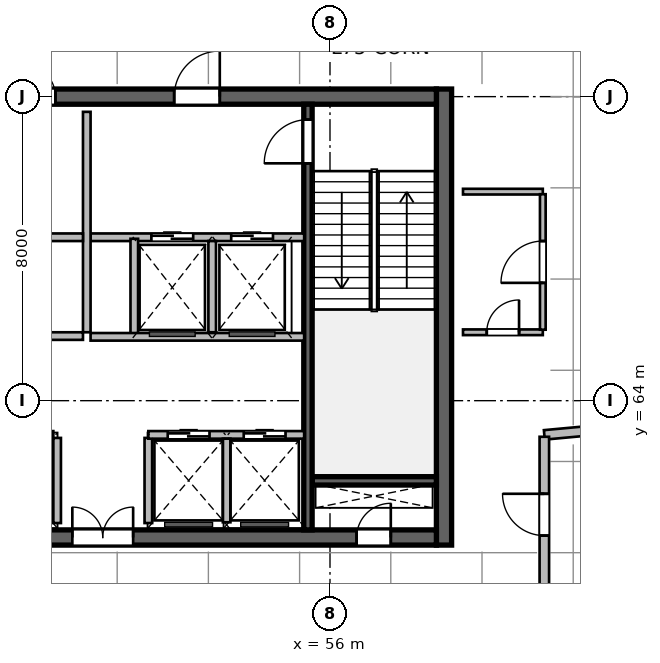
"""IFC4 building model, lengths in metres.
Left out: names, types, materials, properties, quantities, classifications, styles, units other than length and angle.
Written with IfcOpenShell. Run it as: python <this file> out.ifc"""

import sys

from ifc_helpers import new_model, si_unit, direction, frame, frame_2d, origin, place, context, subcontext, project, spatial, rectangle, extrude, source, transform, mapped, element, fill, save


model = new_model("IFC4")
c1 = context("Model", 3, precision=1e-05, world=origin(), true_north=direction((0.0, 1.0)))
c2 = subcontext(c1, "Body", "Model", "MODEL_VIEW")
j1 = project(units=[si_unit("LENGTHUNIT", "METRE"), si_unit("PLANEANGLEUNIT", "RADIAN")], contexts=[c1])
p1 = place(None, origin())
s1 = spatial("IfcSite", under=j1, at=p1, CompositionType="ELEMENT")
p2 = place(p1, origin())
s2 = spatial("IfcBuilding", under=s1, at=p2, CompositionType="ELEMENT")
p3 = place(p2, frame((0.0, 0.0, 307.8)))
s3 = spatial("IfcBuildingStorey", under=s2, at=p3, CompositionType="ELEMENT", Elevation=307.8)
m1 = source(origin(), c2, "Body", "SweptSolid", [
    extrude(rectangle(XDim=12.0, YDim=0.4, at=frame_2d((6.0, 0.0))), origin(), (0.0, 0.0, 1.0), 4.8),
])
p4 = place(p3, frame((59.0, 60.2, 0.0), z_axis=(0.0, 0.0, 1.0), x_axis=(0.0, 1.0, 0.0)))
e1 = element("IfcWall", 1, at=p4, inside=s3, PredefinedType="SHEAR", context=c2, shape_type="MappedRepresentation", body=[
    mapped(m1, transform((0.0, 0.0, 0.0), scale=1.0)),
])
m2 = source(origin(), c2, "Body", "SweptSolid", [
    extrude(rectangle(XDim=21.6, YDim=0.4, at=frame_2d((10.8, 0.0))), origin(), (0.0, 0.0, 1.0), 4.8),
])
p5 = place(p3, frame((37.2, 60.4, 0.0), z_axis=(0.0, 0.0, 1.0), x_axis=(1.0, 0.0, 0.0)))
e2 = element("IfcWall", 2, at=p5, inside=s3, PredefinedType="SHEAR", context=c2, shape_type="MappedRepresentation", body=[
    mapped(m2, transform((0.0, 0.0, 0.0), scale=1.0)),
])
p6 = place(p5, frame((1.1, 0.0, 0.0)))
e3 = element("IfcOpeningElement", 3, at=p6, cuts=e2, PredefinedType="OPENING", context=c2, shape_type="SweptSolid", body=[
    extrude(rectangle(XDim=1.15, YDim=2.15, at=frame_2d((0.575, 1.075))), frame((0.0, 0.21, 0.0), z_axis=(0.0, -1.0, 0.0), x_axis=(1.0, 0.0, 0.0)), (0.0, 0.0, 1.0), 0.42),
])
p7 = place(p5, frame((19.5, 0.0, 0.0)))
e4 = element("IfcOpeningElement", 4, at=p7, cuts=e2, PredefinedType="OPENING", context=c2, shape_type="SweptSolid", body=[
    extrude(rectangle(XDim=0.9, YDim=2.1, at=frame_2d((0.45, 1.05))), frame((0.0, 0.21, 0.0), z_axis=(0.0, -1.0, 0.0), x_axis=(1.0, 0.0, 0.0)), (0.0, 0.0, 1.0), 0.42),
])
p8 = place(p5, frame((12.02, 0.0, 0.0)))
e5 = element("IfcOpeningElement", 5, at=p8, cuts=e2, PredefinedType="OPENING", context=c2, shape_type="SweptSolid", body=[
    extrude(rectangle(XDim=1.6, YDim=2.15, at=frame_2d((0.8, 1.075))), frame((0.0, 0.21, 0.0), z_axis=(0.0, -1.0, 0.0), x_axis=(1.0, 0.0, 0.0)), (0.0, 0.0, 1.0), 0.42),
])
p9 = place(p3, frame((37.2, 72.0, 0.0), z_axis=(0.0, 0.0, 1.0), x_axis=(1.0, 0.0, 0.0)))
e6 = element("IfcWall", 6, at=p9, inside=s3, PredefinedType="SHEAR", context=c2, shape_type="MappedRepresentation", body=[
    mapped(m2, transform((0.0, 0.0, 0.0), scale=1.0)),
])
p10 = place(p9, frame((1.2, 0.0, 0.0)))
e7 = element("IfcOpeningElement", 7, at=p10, cuts=e6, PredefinedType="OPENING", context=c2, shape_type="SweptSolid", body=[
    extrude(rectangle(XDim=0.9, YDim=2.1, at=frame_2d((0.45, 1.05))), frame((0.0, 0.21, 0.0), z_axis=(0.0, -1.0, 0.0), x_axis=(1.0, 0.0, 0.0)), (0.0, 0.0, 1.0), 0.42),
])
p11 = place(p9, frame((14.7, 0.0, 0.0)))
e8 = element("IfcOpeningElement", 8, at=p11, cuts=e6, PredefinedType="OPENING", context=c2, shape_type="SweptSolid", body=[
    extrude(rectangle(XDim=1.2, YDim=2.15, at=frame_2d((0.6, 1.075))), frame((0.0, 0.21, 0.0), z_axis=(0.0, -1.0, 0.0), x_axis=(1.0, 0.0, 0.0)), (0.0, 0.0, 1.0), 0.42),
])
p12 = place(p9, frame((4.15, 0.0, 0.0)))
e9 = element("IfcOpeningElement", 9, at=p12, cuts=e6, PredefinedType="OPENING", context=c2, shape_type="SweptSolid", body=[
    extrude(rectangle(XDim=1.3, YDim=2.15, at=frame_2d((0.65, 1.075))), frame((0.0, 0.21, 0.0), z_axis=(0.0, -1.0, 0.0), x_axis=(1.0, 0.0, 0.0)), (0.0, 0.0, 1.0), 0.42),
])
p13 = place(p9, frame((6.76, 0.0, 0.0)))
e10 = element("IfcOpeningElement", 10, at=p13, cuts=e6, PredefinedType="OPENING", context=c2, shape_type="SweptSolid", body=[
    extrude(rectangle(XDim=0.85, YDim=2.1, at=frame_2d((0.425, 1.05))), frame((0.0, 0.21, 0.0), z_axis=(0.0, -1.0, 0.0), x_axis=(1.0, 0.0, 0.0)), (0.0, 0.0, 1.0), 0.42),
])
p14 = place(p9, frame((8.76, 0.0, 0.0)))
e11 = element("IfcOpeningElement", 11, at=p14, cuts=e6, PredefinedType="OPENING", context=c2, shape_type="SweptSolid", body=[
    extrude(rectangle(XDim=0.85, YDim=2.1, at=frame_2d((0.425, 1.05))), frame((0.0, 0.21, 0.0), z_axis=(0.0, -1.0, 0.0), x_axis=(1.0, 0.0, 0.0)), (0.0, 0.0, 1.0), 0.42),
])
p15 = place(p9, frame((10.725, 0.0, 0.0)))
e12 = element("IfcOpeningElement", 12, at=p15, cuts=e6, PredefinedType="OPENING", context=c2, shape_type="SweptSolid", body=[
    extrude(rectangle(XDim=0.85, YDim=2.1, at=frame_2d((0.425, 1.05))), frame((0.0, 0.21, 0.0), z_axis=(0.0, -1.0, 0.0), x_axis=(1.0, 0.0, 0.0)), (0.0, 0.0, 1.0), 0.42),
])
m3 = source(origin(), c2, "Body", "SweptSolid", [
    extrude(rectangle(XDim=3.27, YDim=0.22, at=frame_2d((1.635, 0.0))), origin(), (0.0, 0.0, 1.0), 4.8),
])
p16 = place(p3, frame((55.53, 61.89, 0.0), z_axis=(0.0, 0.0, 1.0), x_axis=(1.0, 0.0, 0.0)))
e13 = element("IfcWall", 13, at=p16, inside=s3, PredefinedType="SHEAR", context=c2, shape_type="MappedRepresentation", body=[
    mapped(m3, transform((0.0, 0.0, 0.0), scale=1.0)),
])
m4 = source(origin(), c2, "Body", "SweptSolid", [
    extrude(rectangle(XDim=11.2, YDim=0.22, at=frame_2d((5.6, 0.0))), origin(), (0.0, 0.0, 1.0), 4.8),
])
p17 = place(p3, frame((55.42, 60.6, 0.0), z_axis=(0.0, 0.0, 1.0), x_axis=(0.0, 1.0, 0.0)))
e14 = element("IfcWall", 14, at=p17, inside=s3, PredefinedType="SHEAR", context=c2, shape_type="MappedRepresentation", body=[
    mapped(m4, transform((0.0, 0.0, 0.0), scale=1.0)),
])
p18 = place(p17, frame((9.645, 0.0, 0.0)))
e15 = element("IfcOpeningElement", 15, at=p18, cuts=e14, PredefinedType="OPENING", context=c2, shape_type="SweptSolid", body=[
    extrude(rectangle(XDim=1.15, YDim=2.15, at=frame_2d((0.575, 1.075))), frame((0.0, 0.12, 0.0), z_axis=(0.0, -1.0, 0.0), x_axis=(1.0, 0.0, 0.0)), (0.0, 0.0, 1.0), 0.24),
])
m5 = source(origin(), c2, "Body", "SweptSolid", [
    extrude(rectangle(XDim=2.24, YDim=0.2, at=frame_2d((1.12, 0.0))), origin(), (0.0, 0.0, 1.0), 4.5),
])
for number, where, z_axis, x_axis in (
    (16, (48.82, 60.78, 0.0), (0.0, 0.0, 1.0), (0.0, 1.0, 0.0)),
    (17, (51.22, 60.78, 0.0), (0.0, 0.0, 1.0), (0.0, 1.0, 0.0)),
):
    element("IfcWall", number, at=place(p3, frame(where, z_axis=z_axis, x_axis=x_axis)), inside=s3, PredefinedType="SOLIDWALL", context=c2, shape_type="MappedRepresentation", body=[
        mapped(m5, transform((0.0, 0.0, 0.0), scale=1.0)),
    ])
m6 = source(origin(), c2, "Body", "SweptSolid", [
    extrude(rectangle(XDim=5.62, YDim=0.2, at=frame_2d((2.81, 0.0))), origin(), (0.0, 0.0, 1.0), 4.5),
])
p19 = place(p3, frame((49.7, 68.3, 0.0), z_axis=(0.0, 0.0, 1.0), x_axis=(1.0, 0.0, 0.0)))
e18 = element("IfcWall", 18, at=p19, inside=s3, PredefinedType="SOLIDWALL", context=c2, shape_type="MappedRepresentation", body=[
    mapped(m6, transform((0.0, 0.0, 0.0), scale=1.0)),
])
p20 = place(p19, frame((1.6, 0.0, 0.0)))
e19 = element("IfcOpeningElement", 19, at=p20, cuts=e18, PredefinedType="OPENING", context=c2, shape_type="SweptSolid", body=[
    extrude(rectangle(XDim=1.1, YDim=2.15, at=frame_2d((0.55, 1.075))), frame((0.0, 0.11, 0.0), z_axis=(0.0, -1.0, 0.0), x_axis=(1.0, 0.0, 0.0)), (0.0, 0.0, 1.0), 0.22),
])
p21 = place(p19, frame((3.7, 0.0, 0.0)))
e20 = element("IfcOpeningElement", 20, at=p21, cuts=e18, PredefinedType="OPENING", context=c2, shape_type="SweptSolid", body=[
    extrude(rectangle(XDim=1.1, YDim=2.15, at=frame_2d((0.55, 1.075))), frame((0.0, 0.11, 0.0), z_axis=(0.0, -1.0, 0.0), x_axis=(1.0, 0.0, 0.0)), (0.0, 0.0, 1.0), 0.22),
])
m7 = source(origin(), c2, "Body", "SweptSolid", [
    extrude(rectangle(XDim=5.8, YDim=0.2, at=frame_2d((2.9, 0.0))), origin(), (0.0, 0.0, 1.0), 4.5),
])
p22 = place(p3, frame((49.6, 65.8, 0.0), z_axis=(0.0, 0.0, 1.0), x_axis=(0.0, 1.0, 0.0)))
e21 = element("IfcWall", 21, at=p22, inside=s3, PredefinedType="SOLIDWALL", context=c2, shape_type="MappedRepresentation", body=[
    mapped(m7, transform((0.0, 0.0, 0.0), scale=1.0)),
])
m8 = source(origin(), c2, "Body", "SweptSolid", [
    extrude(rectangle(XDim=2.58, YDim=0.2, at=frame_2d((1.29, 0.0))), origin(), (0.0, 0.0, 1.0), 4.5),
])
p23 = place(p3, frame((50.85, 65.68, 0.0), z_axis=(0.0, 0.0, 1.0), x_axis=(0.0, 1.0, 0.0)))
e22 = element("IfcWall", 22, at=p23, inside=s3, PredefinedType="SOLIDWALL", context=c2, shape_type="MappedRepresentation", body=[
    mapped(m8, transform((0.0, 0.0, 0.0), scale=1.0)),
])
m9 = source(origin(), c2, "Body", "SweptSolid", [
    extrude(rectangle(XDim=2.4, YDim=0.2, at=frame_2d((1.2, 0.0))), origin(), (0.0, 0.0, 1.0), 4.5),
])
p24 = place(p3, frame((52.9, 65.8, 0.0), z_axis=(0.0, 0.0, 1.0), x_axis=(0.0, 1.0, 0.0)))
e23 = element("IfcWall", 23, at=p24, inside=s3, PredefinedType="SOLIDWALL", context=c2, shape_type="MappedRepresentation", body=[
    mapped(m9, transform((0.0, 0.0, 0.0), scale=1.0)),
])
p25 = place(p3, frame((49.7, 65.68, 0.0), z_axis=(0.0, 0.0, 1.0), x_axis=(1.0, 0.0, 0.0)))
e24 = element("IfcWall", 24, at=p25, inside=s3, PredefinedType="SOLIDWALL", context=c2, shape_type="MappedRepresentation", body=[
    mapped(m6, transform((0.0, 0.0, 0.0), scale=1.0)),
])
m10 = source(origin(), c2, "Body", "SweptSolid", [
    extrude(rectangle(XDim=8.8, YDim=0.2, at=frame_2d((4.4, 0.0))), origin(), (0.0, 0.0, 1.0), 4.5),
])
p26 = place(p3, frame((40.7, 68.3, 0.0), z_axis=(0.0, 0.0, 1.0), x_axis=(1.0, 0.0, 0.0)))
e25 = element("IfcWall", 25, at=p26, inside=s3, PredefinedType="SOLIDWALL", context=c2, shape_type="MappedRepresentation", body=[
    mapped(m10, transform((0.0, 0.0, 0.0), scale=1.0)),
])
m11 = source(origin(), c2, "Body", "SweptSolid", [
    extrude(rectangle(XDim=8.02, YDim=0.2, at=frame_2d((4.01, 0.0))), origin(), (0.0, 0.0, 1.0), 4.5),
])
p27 = place(p3, frame((40.7, 63.1, 0.0), z_axis=(0.0, 0.0, 1.0), x_axis=(1.0, 0.0, 0.0)))
e26 = element("IfcWall", 26, at=p27, inside=s3, PredefinedType="SOLIDWALL", context=c2, shape_type="MappedRepresentation", body=[
    mapped(m11, transform((0.0, 0.0, 0.0), scale=1.0)),
])
p28 = place(p27, frame((0.72, 0.0, 0.0)))
e27 = element("IfcOpeningElement", 27, at=p28, cuts=e26, PredefinedType="OPENING", context=c2, shape_type="SweptSolid", body=[
    extrude(rectangle(XDim=1.0, YDim=2.15, at=frame_2d((0.5, 1.075))), frame((0.0, 0.11, 0.0), z_axis=(0.0, -1.0, 0.0), x_axis=(1.0, 0.0, 0.0)), (0.0, 0.0, 1.0), 0.22),
])
p29 = place(p27, frame((2.62, 0.0, 0.0)))
e28 = element("IfcOpeningElement", 28, at=p29, cuts=e26, PredefinedType="OPENING", context=c2, shape_type="SweptSolid", body=[
    extrude(rectangle(XDim=1.0, YDim=2.15, at=frame_2d((0.5, 1.075))), frame((0.0, 0.11, 0.0), z_axis=(0.0, -1.0, 0.0), x_axis=(1.0, 0.0, 0.0)), (0.0, 0.0, 1.0), 0.22),
])
p30 = place(p27, frame((4.55, 0.0, 0.0)))
e29 = element("IfcOpeningElement", 29, at=p30, cuts=e26, PredefinedType="OPENING", context=c2, shape_type="SweptSolid", body=[
    extrude(rectangle(XDim=1.0, YDim=2.15, at=frame_2d((0.5, 1.075))), frame((0.0, 0.11, 0.0), z_axis=(0.0, -1.0, 0.0), x_axis=(1.0, 0.0, 0.0)), (0.0, 0.0, 1.0), 0.22),
])
p31 = place(p27, frame((6.55, 0.0, 0.0)))
e30 = element("IfcOpeningElement", 30, at=p31, cuts=e26, PredefinedType="OPENING", context=c2, shape_type="SweptSolid", body=[
    extrude(rectangle(XDim=1.0, YDim=2.15, at=frame_2d((0.5, 1.075))), frame((0.0, 0.11, 0.0), z_axis=(0.0, -1.0, 0.0), x_axis=(1.0, 0.0, 0.0)), (0.0, 0.0, 1.0), 0.22),
])
m12 = source(origin(), c2, "Body", "SweptSolid", [
    extrude(rectangle(XDim=4.1, YDim=0.2, at=frame_2d((2.05, 0.0))), origin(), (0.0, 0.0, 1.0), 4.5),
])
p32 = place(p3, frame((51.22, 63.1, 0.0), z_axis=(0.0, 0.0, 1.0), x_axis=(1.0, 0.0, 0.0)))
e31 = element("IfcWall", 31, at=p32, inside=s3, PredefinedType="SOLIDWALL", context=c2, shape_type="MappedRepresentation", body=[
    mapped(m12, transform((0.0, 0.0, 0.0), scale=1.0)),
])
p33 = place(p32, frame((0.51, 0.0, 0.0)))
e32 = element("IfcOpeningElement", 32, at=p33, cuts=e31, PredefinedType="OPENING", context=c2, shape_type="SweptSolid", body=[
    extrude(rectangle(XDim=1.1, YDim=2.15, at=frame_2d((0.55, 1.075))), frame((0.0, 0.11, 0.0), z_axis=(0.0, -1.0, 0.0), x_axis=(1.0, 0.0, 0.0)), (0.0, 0.0, 1.0), 0.22),
])
p34 = place(p32, frame((2.51, 0.0, 0.0)))
e33 = element("IfcOpeningElement", 33, at=p34, cuts=e31, PredefinedType="OPENING", context=c2, shape_type="SweptSolid", body=[
    extrude(rectangle(XDim=1.1, YDim=2.15, at=frame_2d((0.55, 1.075))), frame((0.0, 0.11, 0.0), z_axis=(0.0, -1.0, 0.0), x_axis=(1.0, 0.0, 0.0)), (0.0, 0.0, 1.0), 0.22),
])
m13 = source(origin(), c2, "Body", "SweptSolid", [
    extrude(rectangle(XDim=2.2, YDim=0.2, at=frame_2d((1.1, 0.0))), origin(), (0.0, 0.0, 1.0), 4.5),
])
p35 = place(p3, frame((53.28, 60.8, 0.0), z_axis=(0.0, 0.0, 1.0), x_axis=(0.0, 1.0, 0.0)))
e34 = element("IfcWall", 34, at=p35, inside=s3, PredefinedType="SOLIDWALL", context=c2, shape_type="MappedRepresentation", body=[
    mapped(m13, transform((0.0, 0.0, 0.0), scale=1.0)),
])
p36 = place(p3, frame((40.7, 65.7, 0.0), z_axis=(0.0, 0.0, 1.0), x_axis=(1.0, 0.0, 0.0)))
e35 = element("IfcWall", 35, at=p36, inside=s3, PredefinedType="SOLIDWALL", context=c2, shape_type="MappedRepresentation", body=[
    mapped(m10, transform((0.0, 0.0, 0.0), scale=1.0)),
])
p37 = place(p36, frame((3.8, 0.0, 0.0)))
e36 = element("IfcOpeningElement", 36, at=p37, cuts=e35, PredefinedType="OPENING", context=c2, shape_type="SweptSolid", body=[
    extrude(rectangle(XDim=0.95, YDim=2.15, at=frame_2d((0.475, 1.075))), frame((0.0, 0.11, 0.0), z_axis=(0.0, -1.0, 0.0), x_axis=(1.0, 0.0, 0.0)), (0.0, 0.0, 1.0), 0.22),
])
m14 = source(origin(), c2, "Body", "SweptSolid", [
    extrude(rectangle(XDim=2.1, YDim=0.15, at=frame_2d((1.05, 0.0))), origin(), (0.0, 0.0, 1.0), 4.5),
])
p38 = place(p3, frame((59.5, 65.8, 0.0), z_axis=(0.0, 0.0, 1.0), x_axis=(1.0, 0.0, 0.0)))
e37 = element("IfcWall", 37, at=p38, inside=s3, PredefinedType="PARTITIONING", context=c2, shape_type="MappedRepresentation", body=[
    mapped(m14, transform((0.0, 0.0, 0.0), scale=1.0)),
])
p39 = place(p38, frame((0.625, 0.0, 0.0)))
e38 = element("IfcOpeningElement", 38, at=p39, cuts=e37, PredefinedType="OPENING", context=c2, shape_type="SweptSolid", body=[
    extrude(rectangle(XDim=0.85, YDim=2.1, at=frame_2d((0.425, 1.05))), frame((0.0, 0.085, 0.0), z_axis=(0.0, -1.0, 0.0), x_axis=(1.0, 0.0, 0.0)), (0.0, 0.0, 1.0), 0.17),
])
p40 = place(p3, frame((59.5, 69.5, 0.0), z_axis=(0.0, 0.0, 1.0), x_axis=(1.0, 0.0, 0.0)))
e39 = element("IfcWall", 39, at=p40, inside=s3, PredefinedType="PARTITIONING", context=c2, shape_type="MappedRepresentation", body=[
    mapped(m14, transform((0.0, 0.0, 0.0), scale=1.0)),
])
m15 = source(origin(), c2, "Body", "SweptSolid", [
    extrude(rectangle(XDim=3.565, YDim=0.15, at=frame_2d((1.783, 0.0))), origin(), (0.0, 0.0, 1.0), 4.5),
])
p41 = place(p3, frame((61.6, 65.867, 0.0), z_axis=(0.0, 0.0, 1.0), x_axis=(0.0, 1.0, 0.0)))
e40 = element("IfcWall", 40, at=p41, inside=s3, PredefinedType="PARTITIONING", context=c2, shape_type="MappedRepresentation", body=[
    mapped(m15, transform((0.0, 0.0, 0.0), scale=1.0)),
])
p42 = place(p41, frame((1.232, 0.0, 0.0)))
e41 = element("IfcOpeningElement", 41, at=p42, cuts=e40, PredefinedType="OPENING", context=c2, shape_type="SweptSolid", body=[
    extrude(rectangle(XDim=1.1, YDim=2.15, at=frame_2d((0.55, 1.075))), frame((0.0, 0.085, 0.0), z_axis=(0.0, -1.0, 0.0), x_axis=(1.0, 0.0, 0.0)), (0.0, 0.0, 1.0), 0.17),
])
m16 = source(origin(), c2, "Body", "SweptSolid", [
    extrude(rectangle(XDim=11.788, YDim=0.25, at=frame_2d((5.894, 0.0))), origin(), (0.0, 0.0, 1.0), 4.5),
])
p43 = place(p3, frame((61.64, 63.1, 0.0), z_axis=(0.0, 0.0, 1.0), x_axis=(0.995763003616, 0.091956732379, 0.0)))
e42 = element("IfcWall", 42, at=p43, inside=s3, PredefinedType="PARTITIONING", context=c2, shape_type="MappedRepresentation", body=[
    mapped(m16, transform((0.0, 0.0, 0.0), scale=1.0)),
])
m17 = source(origin(), c2, "Body", "SweptSolid", [
    extrude(rectangle(XDim=14.581, YDim=0.25, at=frame_2d((7.291, 0.0))), origin(), (0.0, 0.0, 1.0), 4.174),
])
p44 = place(p3, frame((61.64, 48.469, 0.0), z_axis=(0.0, 0.0, 1.0), x_axis=(0.0, 1.0, 0.0)))
e43 = element("IfcWall", 43, at=p44, inside=s3, PredefinedType="PARTITIONING", context=c2, shape_type="MappedRepresentation", body=[
    mapped(m17, transform((0.0, 0.0, 0.0), scale=1.0)),
])
p45 = place(p44, frame((11.981, 0.0, 0.0)))
e44 = element("IfcOpeningElement", 44, at=p45, cuts=e43, PredefinedType="OPENING", context=c2, shape_type="SweptSolid", body=[
    extrude(rectangle(XDim=1.1, YDim=2.15, at=frame_2d((0.55, 1.075))), frame((0.0, 0.135, 0.0), z_axis=(0.0, -1.0, 0.0), x_axis=(1.0, 0.0, 0.0)), (0.0, 0.0, 1.0), 0.27),
])
m18 = source(origin(), c2, "Body", "SweptSolid", [
    extrude(rectangle(XDim=0.9, YDim=2.1, at=frame_2d((0.45, 1.05))), frame((0.0, 0.025, 0.0), z_axis=(0.0, -1.0, 0.0), x_axis=(1.0, 0.0, 0.0)), (0.0, 0.0, 1.0), 0.05),
])
p46 = place(p7, origin())
e45 = element("IfcDoor", 45, at=p46, inside=s3, OperationType="SINGLE_SWING_RIGHT", PredefinedType="DOOR", context=c2, shape_type="MappedRepresentation", body=[
    mapped(m18, transform((0.0, 0.0, 0.0), scale=1.0)),
])
fill(e4, e45)
m19 = source(origin(), c2, "Body", "SweptSolid", [
    extrude(rectangle(XDim=1.15, YDim=2.15, at=frame_2d((0.575, 1.075))), frame((0.0, 0.025, 0.0), z_axis=(0.0, -1.0, 0.0), x_axis=(1.0, 0.0, 0.0)), (0.0, 0.0, 1.0), 0.05),
])
p47 = place(p18, origin())
e46 = element("IfcDoor", 46, at=p47, inside=s3, OperationType="SINGLE_SWING_LEFT", PredefinedType="DOOR", context=c2, shape_type="MappedRepresentation", body=[
    mapped(m19, transform((0.0, 0.0, 0.0), scale=1.0)),
])
fill(e15, e46)
m20 = source(origin(), c2, "Body", "SweptSolid", [
    extrude(rectangle(XDim=1.6, YDim=2.15, at=frame_2d((0.8, 1.075))), frame((0.0, 0.025, 0.0), z_axis=(0.0, -1.0, 0.0), x_axis=(1.0, 0.0, 0.0)), (0.0, 0.0, 1.0), 0.05),
])
p48 = place(p8, origin())
e47 = element("IfcDoor", 47, at=p48, inside=s3, OperationType="DOUBLE_DOOR_SINGLE_SWING", PredefinedType="DOOR", context=c2, shape_type="MappedRepresentation", body=[
    mapped(m20, transform((0.0, 0.0, 0.0), scale=1.0)),
])
fill(e5, e47)
m21 = source(origin(), c2, "Body", "SweptSolid", [
    extrude(rectangle(XDim=1.2, YDim=2.15, at=frame_2d((0.6, 1.075))), frame((0.0, 0.025, 0.0), z_axis=(0.0, -1.0, 0.0), x_axis=(1.0, 0.0, 0.0)), (0.0, 0.0, 1.0), 0.05),
])
p49 = place(p11, origin())
e48 = element("IfcDoor", 48, at=p49, inside=s3, OperationType="SINGLE_SWING_RIGHT", PredefinedType="DOOR", context=c2, shape_type="MappedRepresentation", body=[
    mapped(m21, transform((0.0, 0.0, 0.0), scale=1.0)),
])
fill(e8, e48)
m22 = source(origin(), c2, "Body", "SweptSolid", [
    extrude(rectangle(XDim=1.1, YDim=2.15, at=frame_2d((0.55, 1.075))), frame((0.0, 0.025, 0.0), z_axis=(0.0, -1.0, 0.0), x_axis=(1.0, 0.0, 0.0)), (0.0, 0.0, 1.0), 0.05),
])
p50 = place(p20, origin())
e49 = element("IfcDoor", 49, at=p50, inside=s3, OperationType="DOUBLE_DOOR_SLIDING", PredefinedType="DOOR", context=c2, shape_type="MappedRepresentation", body=[
    mapped(m22, transform((0.0, 0.0, 0.0), scale=1.0)),
])
fill(e19, e49)
p51 = place(p21, origin())
e50 = element("IfcDoor", 50, at=p51, inside=s3, OperationType="DOUBLE_DOOR_SLIDING", PredefinedType="DOOR", context=c2, shape_type="MappedRepresentation", body=[
    mapped(m22, transform((0.0, 0.0, 0.0), scale=1.0)),
])
fill(e20, e50)
m23 = source(origin(), c2, "Body", "SweptSolid", [
    extrude(rectangle(XDim=0.85, YDim=2.1, at=frame_2d((0.425, 1.05))), frame((0.0, 0.025, 0.0), z_axis=(0.0, -1.0, 0.0), x_axis=(1.0, 0.0, 0.0)), (0.0, 0.0, 1.0), 0.05),
])
p52 = place(p15, origin())
e51 = element("IfcDoor", 51, at=p52, inside=s3, OperationType="SINGLE_SWING_LEFT", PredefinedType="DOOR", context=c2, shape_type="MappedRepresentation", body=[
    mapped(m23, transform((0.0, 0.0, 0.0), scale=1.0)),
])
fill(e12, e51)
m24 = source(origin(), c2, "Body", "SweptSolid", [
    extrude(rectangle(XDim=1.1, YDim=2.15, at=frame_2d((0.55, 1.075))), frame((0.0, 0.025, 0.0), z_axis=(0.0, -1.0, 0.0), x_axis=(1.0, 0.0, 0.0)), (0.0, 0.0, 1.0), 0.05),
])
p53 = place(p33, origin())
e52 = element("IfcDoor", 52, at=p53, inside=s3, OperationType="DOUBLE_DOOR_SLIDING", PredefinedType="DOOR", context=c2, shape_type="MappedRepresentation", body=[
    mapped(m24, transform((0.0, 0.0, 0.0), scale=1.0)),
])
fill(e32, e52)
p54 = place(p34, origin())
e53 = element("IfcDoor", 53, at=p54, inside=s3, OperationType="DOUBLE_DOOR_SLIDING", PredefinedType="DOOR", context=c2, shape_type="MappedRepresentation", body=[
    mapped(m24, transform((0.0, 0.0, 0.0), scale=1.0)),
])
fill(e33, e53)
p55 = place(p39, origin())
e54 = element("IfcDoor", 54, at=p55, inside=s3, OperationType="SINGLE_SWING_RIGHT", PredefinedType="DOOR", context=c2, shape_type="MappedRepresentation", body=[
    mapped(m23, transform((0.0, 0.0, 0.0), scale=1.0)),
])
fill(e38, e54)
m25 = source(origin(), c2, "Body", "SweptSolid", [
    extrude(rectangle(XDim=1.1, YDim=2.15, at=frame_2d((0.55, 1.075))), frame((0.0, 0.025, 0.0), z_axis=(0.0, -1.0, 0.0), x_axis=(1.0, 0.0, 0.0)), (0.0, 0.0, 1.0), 0.05),
])
p56 = place(p45, origin())
e55 = element("IfcDoor", 55, at=p56, inside=s3, OperationType="SINGLE_SWING_RIGHT", PredefinedType="DOOR", context=c2, shape_type="MappedRepresentation", body=[
    mapped(m25, transform((0.0, 0.0, 0.0), scale=1.0)),
])
fill(e44, e55)
p57 = place(p42, origin())
e56 = element("IfcDoor", 56, at=p57, inside=s3, OperationType="SINGLE_SWING_LEFT", PredefinedType="DOOR", context=c2, shape_type="MappedRepresentation", body=[
    mapped(m25, transform((0.0, 0.0, 0.0), scale=1.0)),
])
fill(e41, e56)
save(model, sys.argv[1])
